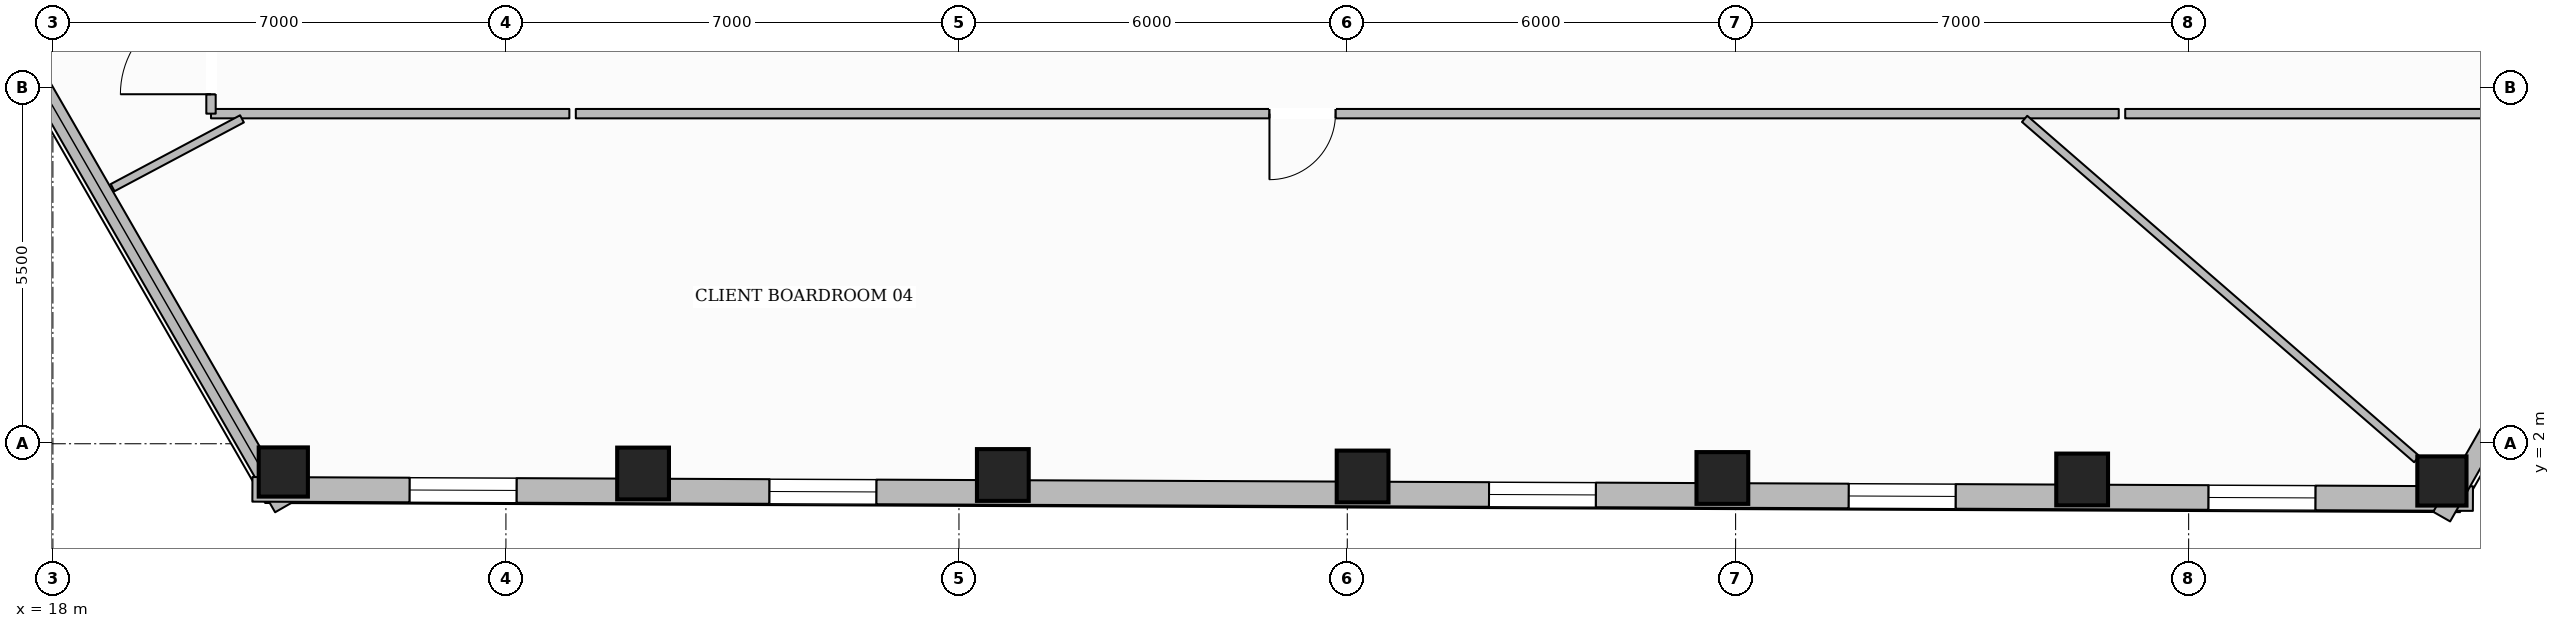
"""IFC4 building model, lengths in metres.
Left out: names, types, materials, properties, quantities, classifications, styles, units other than length and angle.
Written with IfcOpenShell. Run it as: python <this file> out.ifc"""

import sys

from ifc_helpers import new_model, si_unit, direction, frame, frame_2d, origin, origin_2d, place, context, subcontext, project, spatial, rectangle, hollow_rectangle, extrude, element, fill, save


model = new_model("IFC4")
c1 = context("Model", 3, precision=1e-05, world=origin(), true_north=direction((0.0, 1.0)))
c2 = subcontext(c1, "Body", "Model", "MODEL_VIEW")
j1 = project(units=[si_unit("LENGTHUNIT", "METRE"), si_unit("PLANEANGLEUNIT", "RADIAN")], contexts=[c1])
p1 = place(None, origin())
s1 = spatial("IfcSite", under=j1, at=p1, CompositionType="ELEMENT")
p2 = place(p1, origin())
s2 = spatial("IfcBuilding", under=s1, at=p2, CompositionType="ELEMENT")
p3 = place(p2, frame((0.0, 0.0, 36.8)))
s3 = spatial("IfcBuildingStorey", under=s2, at=p3, CompositionType="ELEMENT", Elevation=36.8)
p4 = place(p3, frame((21.56, 1.563, 0.0), z_axis=(0.0, 0.0, 1.0), x_axis=(1.0, 0.0, 0.0)))
e1 = element("IfcColumn", 1, at=p4, inside=s3, PredefinedType="COLUMN", context=c2, shape_type="SweptSolid", body=[
    extrude(hollow_rectangle(XDim=0.76, YDim=0.76, WallThickness=0.035, at=origin_2d()), origin(), (0.0, 0.0, 1.0), 3.59),
])
for number, where, z_axis, x_axis in (
    (2, (27.119, 1.54, 0.0), (0.0, 0.0, 1.0), (1.0, 0.0, 0.0)),
    (3, (32.678, 1.517, 0.0), (0.0, 0.0, 1.0), (1.0, 0.0, 0.0)),
    (4, (38.237, 1.494, 0.0), (0.0, 0.0, 1.0), (1.0, 0.0, 0.0)),
    (5, (43.796, 1.471, 0.0), (0.0, 0.0, 1.0), (1.0, 0.0, 0.0)),
    (6, (49.354, 1.448, 0.0), (0.0, 0.0, 1.0), (1.0, 0.0, 0.0)),
):
    element("IfcColumn", number, at=place(p3, frame(where, z_axis=z_axis, x_axis=x_axis)), inside=s3, PredefinedType="COLUMN", context=c2, shape_type="SweptSolid", body=[
        extrude(hollow_rectangle(XDim=0.8, YDim=0.8, WallThickness=0.036, at=origin_2d()), origin(), (0.0, 0.0, 1.0), 3.59),
    ])
p5 = place(p3, frame((54.913, 1.425, 0.0), z_axis=(0.0, 0.0, 1.0), x_axis=(1.0, 0.0, 0.0)))
e7 = element("IfcColumn", 7, at=p5, inside=s3, PredefinedType="COLUMN", context=c2, shape_type="SweptSolid", body=[
    extrude(hollow_rectangle(XDim=0.76, YDim=0.76, WallThickness=0.035, at=origin_2d()), origin(), (0.0, 0.0, 1.0), 3.59),
])
p6 = place(p3, frame((21.564, 1.016, 0.0), z_axis=(0.0, 0.0, 1.0), x_axis=(-0.49869007713, 0.866780368359, 0.0)))
e8 = element("IfcWall", 8, at=p6, inside=s3, PredefinedType="STANDARD", context=c2, shape_type="SweptSolid", body=[
    extrude(rectangle(XDim=16.486, YDim=0.3, at=frame_2d((8.243, 0.0))), origin(), (0.0, 0.0, 1.0), 2.97),
])
p7 = place(p3, frame((55.393, 1.153, 0.0), z_axis=(0.0, 0.0, 1.0), x_axis=(-0.999991365452, 0.004155601268, 0.0)))
e9 = element("IfcWall", 9, at=p7, inside=s3, PredefinedType="STANDARD", context=c2, shape_type="SweptSolid", body=[
    extrude(rectangle(XDim=34.31, YDim=0.38, at=frame_2d((17.155, 0.0))), origin(), (0.0, 0.0, 1.0), 2.97),
])
p8 = place(p7, frame((30.229, 0.0, 0.65)))
e10 = element("IfcOpeningElement", 10, at=p8, cuts=e9, PredefinedType="OPENING", context=c2, shape_type="SweptSolid", body=[
    extrude(rectangle(XDim=1.65, YDim=1.75, at=frame_2d((0.825, 0.875))), frame((0.0, 0.2, 0.0), z_axis=(0.0, -1.0, 0.0), x_axis=(1.0, 0.0, 0.0)), (0.0, 0.0, 1.0), 0.4),
])
p9 = place(p7, frame((24.67, 0.0, 0.65)))
e11 = element("IfcOpeningElement", 11, at=p9, cuts=e9, PredefinedType="OPENING", context=c2, shape_type="SweptSolid", body=[
    extrude(rectangle(XDim=1.65, YDim=1.75, at=frame_2d((0.825, 0.875))), frame((0.0, 0.2, 0.0), z_axis=(0.0, -1.0, 0.0), x_axis=(1.0, 0.0, 0.0)), (0.0, 0.0, 1.0), 0.4),
])
p10 = place(p7, frame((13.552, 0.0, 0.65)))
e12 = element("IfcOpeningElement", 12, at=p10, cuts=e9, PredefinedType="OPENING", context=c2, shape_type="SweptSolid", body=[
    extrude(rectangle(XDim=1.65, YDim=1.75, at=frame_2d((0.825, 0.875))), frame((0.0, 0.2, 0.0), z_axis=(0.0, -1.0, 0.0), x_axis=(1.0, 0.0, 0.0)), (0.0, 0.0, 1.0), 0.4),
])
p11 = place(p7, frame((7.994, 0.0, 0.65)))
e13 = element("IfcOpeningElement", 13, at=p11, cuts=e9, PredefinedType="OPENING", context=c2, shape_type="SweptSolid", body=[
    extrude(rectangle(XDim=1.65, YDim=1.75, at=frame_2d((0.825, 0.875))), frame((0.0, 0.2, 0.0), z_axis=(0.0, -1.0, 0.0), x_axis=(1.0, 0.0, 0.0)), (0.0, 0.0, 1.0), 0.4),
])
p12 = place(p7, frame((2.435, 0.0, 0.65)))
e14 = element("IfcOpeningElement", 14, at=p12, cuts=e9, PredefinedType="OPENING", context=c2, shape_type="SweptSolid", body=[
    extrude(rectangle(XDim=1.65, YDim=1.75, at=frame_2d((0.825, 0.875))), frame((0.0, 0.2, 0.0), z_axis=(0.0, -1.0, 0.0), x_axis=(1.0, 0.0, 0.0)), (0.0, 0.0, 1.0), 0.4),
])
p13 = place(p3, frame((63.016, 15.098, 0.0), z_axis=(0.0, 0.0, 1.0), x_axis=(-0.495085083472, -0.86884449709, 0.0)))
e15 = element("IfcWall", 15, at=p13, inside=s3, PredefinedType="STANDARD", context=c2, shape_type="SweptSolid", body=[
    extrude(rectangle(XDim=16.372, YDim=0.3, at=frame_2d((8.186, 0.0))), origin(), (0.0, 0.0, 1.0), 2.97),
])
p14 = place(p13, frame((7.586, 0.0, 0.65)))
e16 = element("IfcOpeningElement", 16, at=p14, cuts=e15, PredefinedType="OPENING", context=c2, shape_type="SweptSolid", body=[
    extrude(rectangle(XDim=1.2, YDim=1.7, at=frame_2d((0.6, 0.85))), frame((0.0, 0.16, 0.0), z_axis=(0.0, -1.0, 0.0), x_axis=(1.0, 0.0, 0.0)), (0.0, 0.0, 1.0), 0.32),
])
p15 = place(p3, frame((56.076, 7.1, 0.0), z_axis=(0.0, 0.0, 1.0), x_axis=(-1.0, 0.0, 0.0)))
e17 = element("IfcWall", 17, at=p15, inside=s3, PredefinedType="PARTITIONING", context=c2, shape_type="SweptSolid", body=[
    extrude(rectangle(XDim=6.056, YDim=0.145, at=frame_2d((3.028, 0.0))), origin(), (0.0, 0.0, 1.0), 3.59),
])
p16 = place(p3, frame((49.92, 7.1, 0.0), z_axis=(0.0, 0.0, 1.0), x_axis=(-1.0, 0.0, 0.0)))
e18 = element("IfcWall", 18, at=p16, inside=s3, PredefinedType="PARTITIONING", context=c2, shape_type="SweptSolid", body=[
    extrude(rectangle(XDim=23.84, YDim=0.145, at=frame_2d((11.92, 0.0))), origin(), (0.0, 0.0, 1.0), 3.278),
])
p17 = place(p16, frame((12.102, 0.0, 0.0)))
e19 = element("IfcOpeningElement", 19, at=p17, cuts=e18, PredefinedType="OPENING", context=c2, shape_type="SweptSolid", body=[
    extrude(rectangle(XDim=1.02, YDim=2.15, at=frame_2d((0.51, 1.075))), frame((0.0, 0.083, 0.0), z_axis=(0.0, -1.0, 0.0), x_axis=(1.0, 0.0, 0.0)), (0.0, 0.0, 1.0), 0.165),
])
p18 = place(p3, frame((25.98, 7.1, 0.0), z_axis=(0.0, 0.0, 1.0), x_axis=(-1.0, 0.0, 0.0)))
e20 = element("IfcWall", 20, at=p18, inside=s3, PredefinedType="PARTITIONING", context=c2, shape_type="SweptSolid", body=[
    extrude(rectangle(XDim=5.537, YDim=0.145, at=frame_2d((2.769, 0.0))), origin(), (0.0, 0.0, 1.0), 3.59),
])
p19 = place(p3, frame((20.443, 7.1, 0.0), z_axis=(0.0, 0.0, 1.0), x_axis=(0.0, 1.0, 0.0)))
e21 = element("IfcWall", 21, at=p19, inside=s3, PredefinedType="PARTITIONING", context=c2, shape_type="SweptSolid", body=[
    extrude(rectangle(XDim=2.0, YDim=0.145, at=frame_2d((1.0, 0.0))), origin(), (0.0, 0.0, 1.0), 3.59),
])
p20 = place(p19, frame((0.3, 0.0, 0.0)))
e22 = element("IfcOpeningElement", 22, at=p20, cuts=e21, PredefinedType="OPENING", context=c2, shape_type="SweptSolid", body=[
    extrude(rectangle(XDim=1.4, YDim=2.2, at=frame_2d((0.7, 1.1))), frame((0.0, 0.083, 0.0), z_axis=(0.0, -1.0, 0.0), x_axis=(1.0, 0.0, 0.0)), (0.0, 0.0, 1.0), 0.165),
])
p21 = place(p3, frame((20.922, 7.02, 0.0), z_axis=(0.0, 0.0, 1.0), x_axis=(-0.882952292077, -0.469462724736, 0.0)))
e23 = element("IfcWall", 23, at=p21, inside=s3, PredefinedType="PARTITIONING", context=c2, shape_type="SweptSolid", body=[
    extrude(rectangle(XDim=2.264, YDim=0.125, at=frame_2d((1.132, 0.0))), origin(), (0.0, 0.0, 1.0), 3.59),
])
p22 = place(p3, frame((48.465, 7.02, 0.0), z_axis=(0.0, 0.0, 1.0), x_axis=(0.755333542889, -0.655340551916, 0.0)))
e24 = element("IfcWall", 24, at=p22, inside=s3, PredefinedType="PARTITIONING", context=c2, shape_type="SweptSolid", body=[
    extrude(rectangle(XDim=8.023, YDim=0.125, at=frame_2d((4.011, 0.0))), origin(), (0.0, 0.0, 1.0), 3.057),
])
p23 = place(p8, origin())
e25 = element("IfcWindow", 25, at=p23, inside=s3, PartitioningType="SINGLE_PANEL", PredefinedType="WINDOW", context=c2, shape_type="SweptSolid", body=[
    extrude(rectangle(XDim=1.65, YDim=1.75, at=frame_2d((0.825, 0.875))), frame((0.0, 0.03, 0.0), z_axis=(0.0, -1.0, 0.0), x_axis=(1.0, 0.0, 0.0)), (0.0, 0.0, 1.0), 0.06),
])
fill(e10, e25)
p24 = place(p9, origin())
e26 = element("IfcWindow", 26, at=p24, inside=s3, PartitioningType="SINGLE_PANEL", PredefinedType="WINDOW", context=c2, shape_type="SweptSolid", body=[
    extrude(rectangle(XDim=1.65, YDim=1.75, at=frame_2d((0.825, 0.875))), frame((0.0, 0.03, 0.0), z_axis=(0.0, -1.0, 0.0), x_axis=(1.0, 0.0, 0.0)), (0.0, 0.0, 1.0), 0.06),
])
fill(e11, e26)
p25 = place(p10, origin())
e27 = element("IfcWindow", 27, at=p25, inside=s3, PartitioningType="SINGLE_PANEL", PredefinedType="WINDOW", context=c2, shape_type="SweptSolid", body=[
    extrude(rectangle(XDim=1.65, YDim=1.75, at=frame_2d((0.825, 0.875))), frame((0.0, 0.03, 0.0), z_axis=(0.0, -1.0, 0.0), x_axis=(1.0, 0.0, 0.0)), (0.0, 0.0, 1.0), 0.06),
])
fill(e12, e27)
p26 = place(p11, origin())
e28 = element("IfcWindow", 28, at=p26, inside=s3, PartitioningType="SINGLE_PANEL", PredefinedType="WINDOW", context=c2, shape_type="SweptSolid", body=[
    extrude(rectangle(XDim=1.65, YDim=1.75, at=frame_2d((0.825, 0.875))), frame((0.0, 0.03, 0.0), z_axis=(0.0, -1.0, 0.0), x_axis=(1.0, 0.0, 0.0)), (0.0, 0.0, 1.0), 0.06),
])
fill(e13, e28)
p27 = place(p12, origin())
e29 = element("IfcWindow", 29, at=p27, inside=s3, PartitioningType="SINGLE_PANEL", PredefinedType="WINDOW", context=c2, shape_type="SweptSolid", body=[
    extrude(rectangle(XDim=1.65, YDim=1.75, at=frame_2d((0.825, 0.875))), frame((0.0, 0.03, 0.0), z_axis=(0.0, -1.0, 0.0), x_axis=(1.0, 0.0, 0.0)), (0.0, 0.0, 1.0), 0.06),
])
fill(e14, e29)
p28 = place(p20, origin())
e30 = element("IfcDoor", 30, at=p28, inside=s3, OperationType="SINGLE_SWING_LEFT", PredefinedType="DOOR", context=c2, shape_type="SweptSolid", body=[
    extrude(rectangle(XDim=1.4, YDim=2.2, at=frame_2d((0.7, 1.1))), frame((0.0, 0.025, 0.0), z_axis=(0.0, -1.0, 0.0), x_axis=(1.0, 0.0, 0.0)), (0.0, 0.0, 1.0), 0.05),
])
fill(e22, e30)
p29 = place(p17, origin())
e31 = element("IfcDoor", 31, at=p29, inside=s3, OperationType="SINGLE_SWING_RIGHT", PredefinedType="DOOR", context=c2, shape_type="SweptSolid", body=[
    extrude(rectangle(XDim=1.02, YDim=2.15, at=frame_2d((0.51, 1.075))), frame((0.0, 0.025, 0.0), z_axis=(0.0, -1.0, 0.0), x_axis=(1.0, 0.0, 0.0)), (0.0, 0.0, 1.0), 0.05),
])
fill(e19, e31)
save(model, sys.argv[1])
